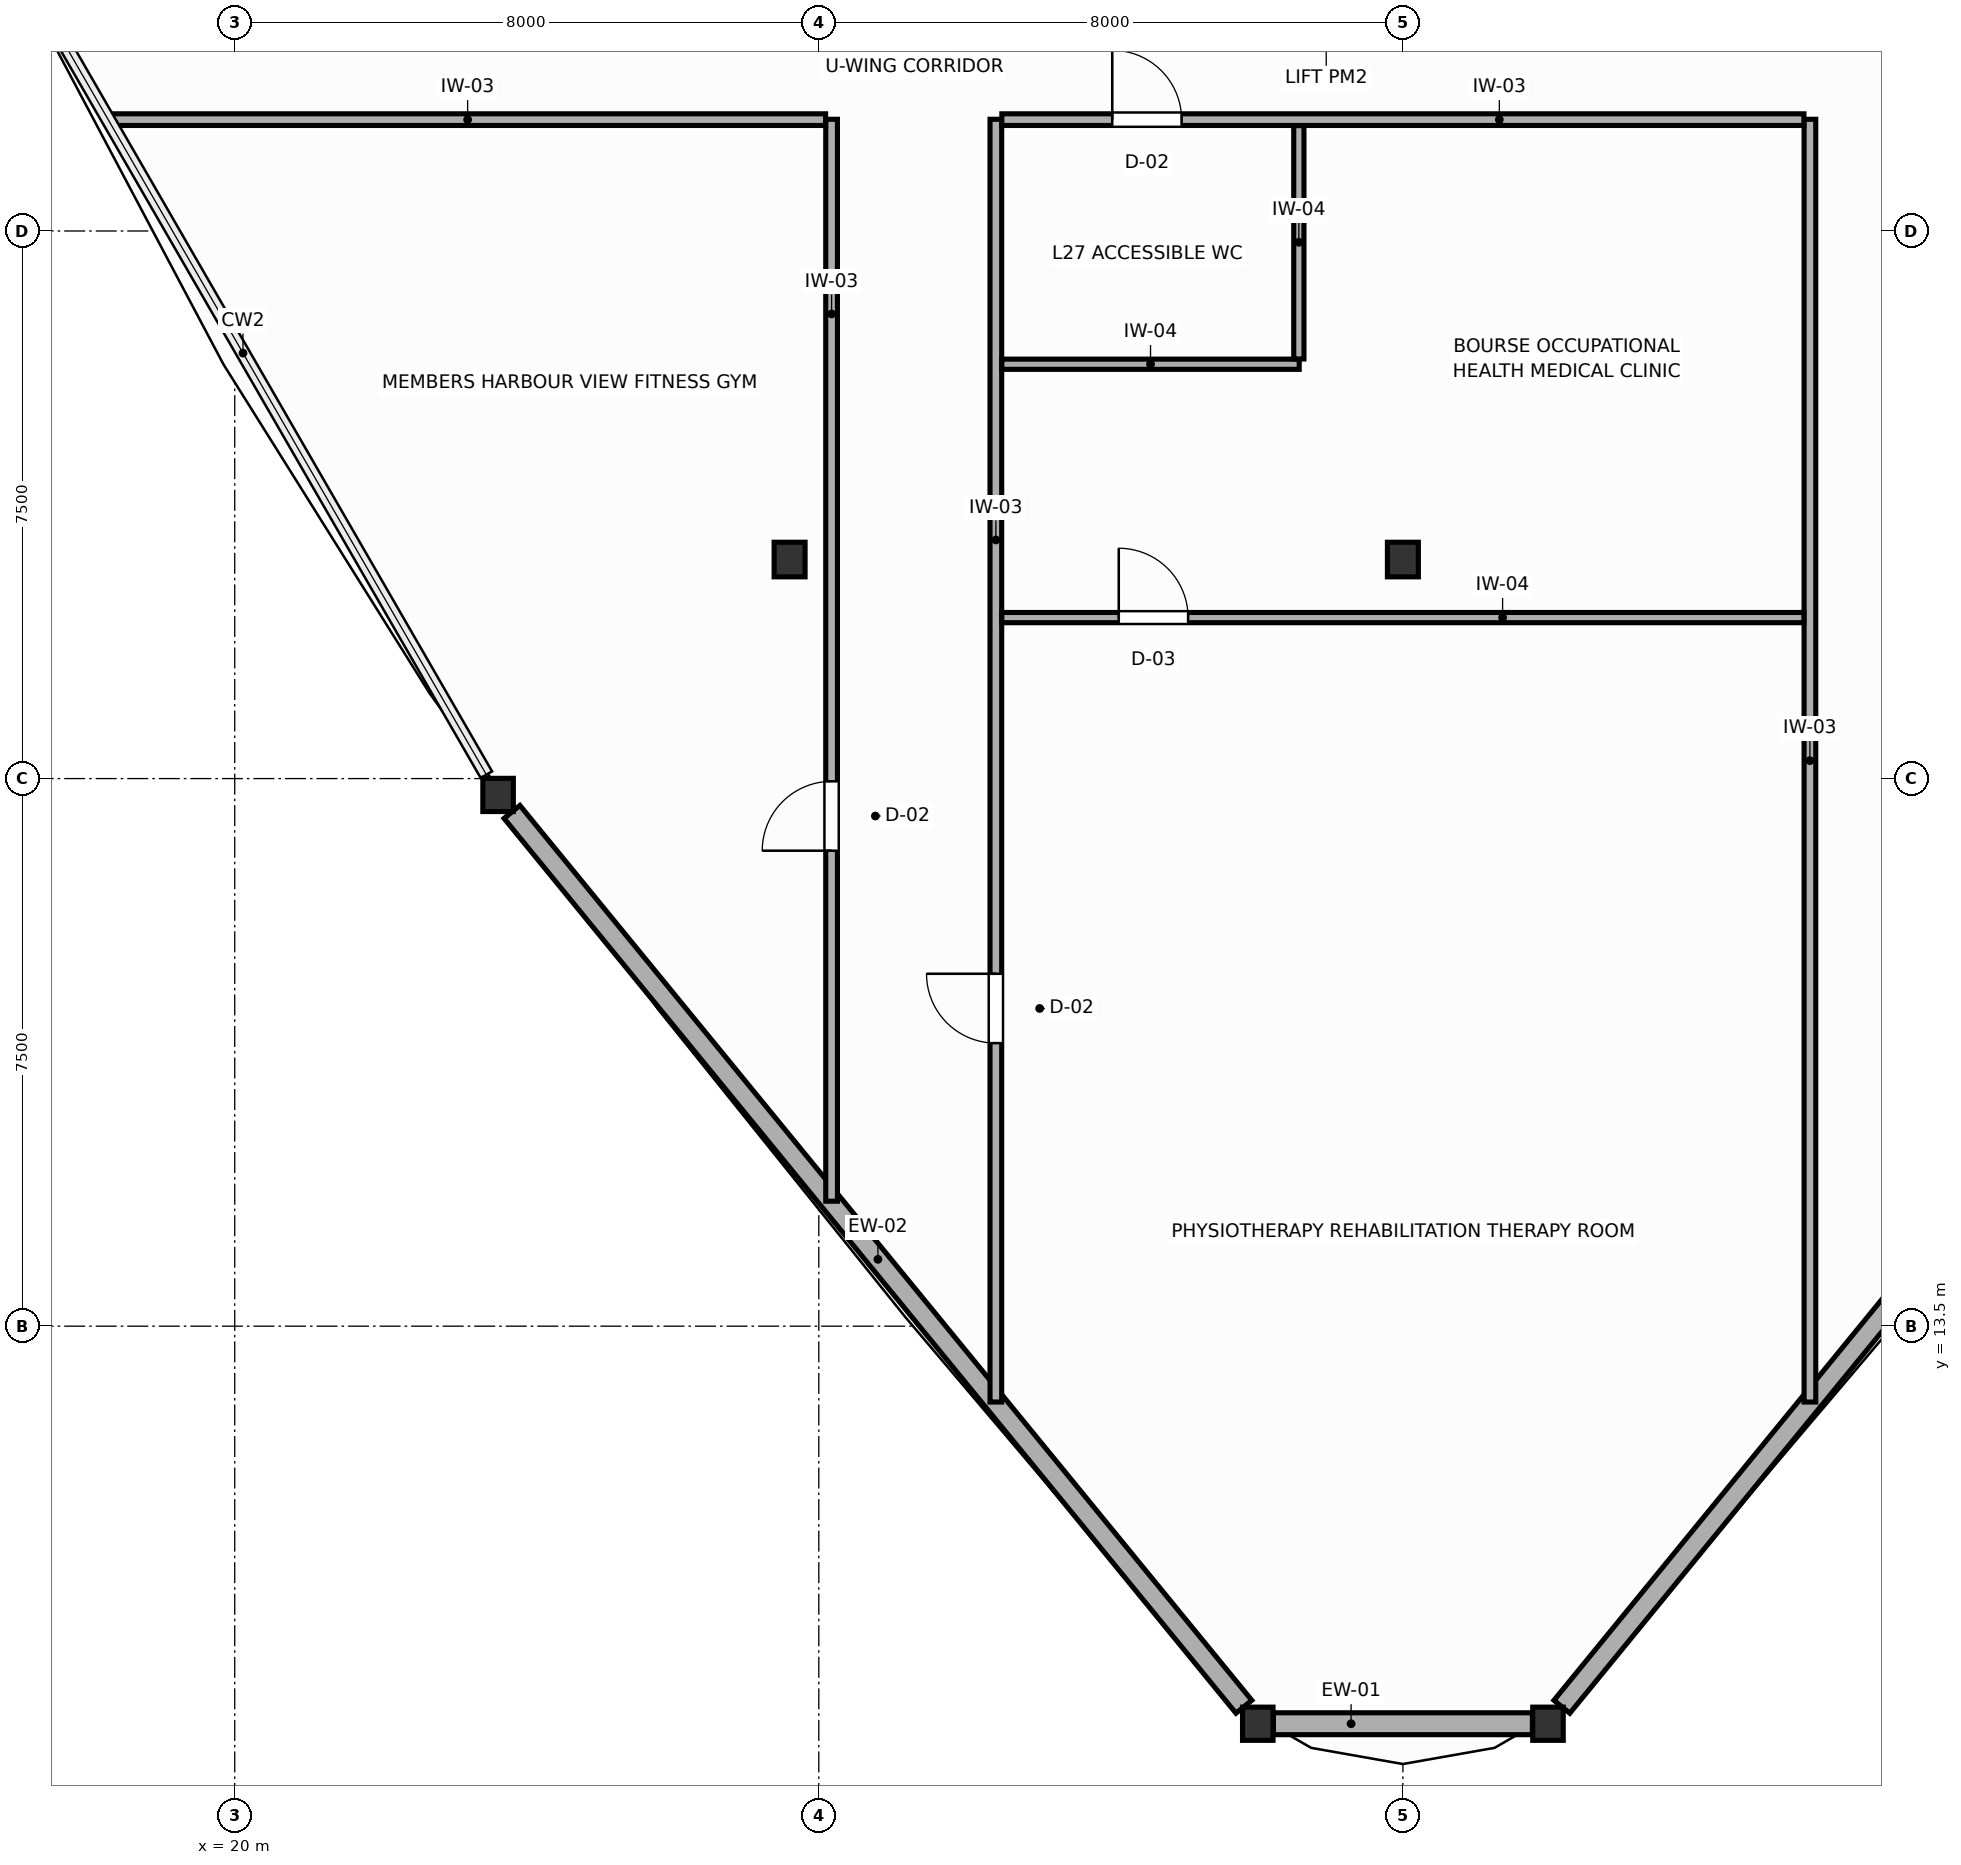
"""IFC4 building model, lengths in metres.
Left out: names, types, materials, properties, quantities, classifications, styles, units other than length and angle.
Written with IfcOpenShell. Run it as: python <this file> out.ifc"""

import sys

from ifc_helpers import new_model, si_unit, direction, frame, frame_2d, origin, origin_2d, place, context, subcontext, project, spatial, rectangle, i_section, extrude, source, transform, mapped, element, fill, save


model = new_model("IFC4")
c1 = context("Model", 3, precision=1e-05, world=origin(), true_north=direction((0.0, 1.0)))
c2 = subcontext(c1, "Body", "Model", "MODEL_VIEW")
j1 = project(units=[si_unit("LENGTHUNIT", "METRE"), si_unit("PLANEANGLEUNIT", "RADIAN")], contexts=[c1])
p1 = place(None, origin())
s1 = spatial("IfcSite", under=j1, at=p1, CompositionType="ELEMENT")
p2 = place(p1, origin())
s2 = spatial("IfcBuilding", under=s1, at=p2, CompositionType="ELEMENT")
p3 = place(p2, frame((0.0, 0.0, 109.8)))
s3 = spatial("IfcBuildingStorey", under=s2, at=p3, CompositionType="ELEMENT", Elevation=109.8)
m1 = source(origin(), c2, "Body", "SweptSolid", [
    extrude(i_section(OverallWidth=0.424, OverallDepth=0.474, WebThickness=0.045, FlangeThickness=0.072, FilletRadius=0.015, at=origin_2d()), origin(), (0.0, 0.0, 1.0), 3.6),
])
for number, where, z_axis, x_axis in (
    (1, (27.6, 24.0, 0.0), (0.0, 0.0, 1.0), (1.0, 0.0, 0.0)),
    (2, (36.0, 24.0, 0.0), (0.0, 0.0, 1.0), (1.0, 0.0, 0.0)),
):
    element("IfcColumn", number, at=place(p3, frame(where, z_axis=z_axis, x_axis=x_axis)), inside=s3, PredefinedType="COLUMN", context=c2, shape_type="MappedRepresentation", body=[
        mapped(m1, transform((0.0, 0.0, 0.0), scale=1.0)),
    ])
m2 = source(origin(), c2, "Body", "SweptSolid", [
    extrude(i_section(OverallWidth=0.418, OverallDepth=0.455, WebThickness=0.039, FlangeThickness=0.063, FilletRadius=0.015, at=origin_2d()), origin(), (0.0, 0.0, 1.0), 3.6),
])
for number, where, z_axis, x_axis in (
    (3, (23.607, 20.776, 0.0), (0.0, 0.0, 1.0), (1.0, 0.0, 0.0)),
    (4, (34.013, 8.055, 0.0), (0.0, 0.0, 1.0), (1.0, 0.0, 0.0)),
    (5, (37.987, 8.055, 0.0), (0.0, 0.0, 1.0), (1.0, 0.0, 0.0)),
):
    element("IfcColumn", number, at=place(p3, frame(where, z_axis=z_axis, x_axis=x_axis)), inside=s3, PredefinedType="COLUMN", context=c2, shape_type="MappedRepresentation", body=[
        mapped(m2, transform((0.0, 0.0, 0.0), scale=1.0)),
    ])
p4 = place(p3, frame((23.797, 20.543, 0.0), z_axis=(0.0, 0.0, 1.0), x_axis=(0.633140387555, -0.774036982092, 0.0)))
e6 = element("IfcWall", 6, at=p4, inside=s3, PredefinedType="SOLIDWALL", context=c2, shape_type="SweptSolid", body=[
    extrude(rectangle(XDim=15.834, YDim=0.28, at=frame_2d((7.917, 0.0))), origin(), (0.0, 0.0, 1.0), 1.87),
])
p5 = place(p3, frame((34.227, 8.055, 0.0), z_axis=(0.0, 0.0, 1.0), x_axis=(1.0, 0.0, 0.0)))
e7 = element("IfcWall", 7, at=p5, inside=s3, PredefinedType="SOLIDWALL", context=c2, shape_type="SweptSolid", body=[
    extrude(rectangle(XDim=3.547, YDim=0.3, at=frame_2d((1.773, 0.0))), origin(), (0.0, 0.0, 1.0), 1.87),
])
p6 = place(p3, frame((38.177, 8.287, 0.0), z_axis=(0.0, 0.0, 1.0), x_axis=(0.633140387555, 0.774036982092, 0.0)))
e8 = element("IfcWall", 8, at=p6, inside=s3, PredefinedType="SOLIDWALL", context=c2, shape_type="SweptSolid", body=[
    extrude(rectangle(XDim=15.834, YDim=0.28, at=frame_2d((7.917, 0.0))), origin(), (0.0, 0.0, 1.0), 1.87),
])
p7 = place(p3, frame((30.425, 12.461, 0.0), z_axis=(0.0, 0.0, 1.0), x_axis=(0.0, 1.0, 0.0)))
e9 = element("IfcWall", 9, at=p7, inside=s3, PredefinedType="PARTITIONING", context=c2, shape_type="SweptSolid", body=[
    extrude(rectangle(XDim=17.569, YDim=0.16, at=frame_2d((8.785, 0.0))), origin(), (0.0, 0.0, 1.0), 3.4),
])
p8 = place(p7, frame((4.916, 0.0, 0.0)))
e10 = element("IfcOpeningElement", 10, at=p8, cuts=e9, PredefinedType="OPENING", context=c2, shape_type="SweptSolid", body=[
    extrude(rectangle(XDim=0.95, YDim=2.05, at=frame_2d((0.475, 1.025))), frame((0.0, 0.09, 0.0), z_axis=(0.0, -1.0, 0.0), x_axis=(1.0, 0.0, 0.0)), (0.0, 0.0, 1.0), 0.18),
])
p9 = place(p3, frame((41.575, 12.461, 0.0), z_axis=(0.0, 0.0, 1.0), x_axis=(0.0, 1.0, 0.0)))
e11 = element("IfcWall", 11, at=p9, inside=s3, PredefinedType="PARTITIONING", context=c2, shape_type="SweptSolid", body=[
    extrude(rectangle(XDim=17.569, YDim=0.16, at=frame_2d((8.785, 0.0))), origin(), (0.0, 0.0, 1.0), 3.4),
])
p10 = place(p3, frame((28.175, 15.212, 0.0), z_axis=(0.0, 0.0, 1.0), x_axis=(0.0, 1.0, 0.0)))
e12 = element("IfcWall", 12, at=p10, inside=s3, PredefinedType="PARTITIONING", context=c2, shape_type="SweptSolid", body=[
    extrude(rectangle(XDim=14.818, YDim=0.16, at=frame_2d((7.409, 0.0))), origin(), (0.0, 0.0, 1.0), 3.4),
])
p11 = place(p10, frame((4.801, 0.0, 0.0)))
e13 = element("IfcOpeningElement", 13, at=p11, cuts=e12, PredefinedType="OPENING", context=c2, shape_type="SweptSolid", body=[
    extrude(rectangle(XDim=0.95, YDim=2.05, at=frame_2d((0.475, 1.025))), frame((0.0, 0.09, 0.0), z_axis=(0.0, -1.0, 0.0), x_axis=(1.0, 0.0, 0.0)), (0.0, 0.0, 1.0), 0.18),
])
p12 = place(p3, frame((30.507, 30.025, 0.0), z_axis=(0.0, 0.0, 1.0), x_axis=(1.0, 0.0, 0.0)))
e14 = element("IfcWall", 14, at=p12, inside=s3, PredefinedType="PARTITIONING", context=c2, shape_type="SweptSolid", body=[
    extrude(rectangle(XDim=10.986, YDim=0.16, at=frame_2d((5.493, 0.0))), origin(), (0.0, 0.0, 1.0), 3.4),
])
p13 = place(p12, frame((1.512, 0.0, 0.0)))
e15 = element("IfcOpeningElement", 15, at=p13, cuts=e14, PredefinedType="OPENING", context=c2, shape_type="SweptSolid", body=[
    extrude(rectangle(XDim=0.95, YDim=2.05, at=frame_2d((0.475, 1.025))), frame((0.0, 0.09, 0.0), z_axis=(0.0, -1.0, 0.0), x_axis=(1.0, 0.0, 0.0)), (0.0, 0.0, 1.0), 0.18),
])
p14 = place(p3, frame((18.287, 30.025, 0.0), z_axis=(0.0, 0.0, 1.0), x_axis=(1.0, 0.0, 0.0)))
e16 = element("IfcWall", 16, at=p14, inside=s3, PredefinedType="PARTITIONING", context=c2, shape_type="SweptSolid", body=[
    extrude(rectangle(XDim=9.806, YDim=0.16, at=frame_2d((4.903, 0.0))), origin(), (0.0, 0.0, 1.0), 3.4),
])
p15 = place(p3, frame((30.507, 23.205, 0.0), z_axis=(0.0, 0.0, 1.0), x_axis=(1.0, 0.0, 0.0)))
e17 = element("IfcWall", 17, at=p15, inside=s3, PredefinedType="PARTITIONING", context=c2, shape_type="SweptSolid", body=[
    extrude(rectangle(XDim=10.986, YDim=0.14, at=frame_2d((5.493, 0.0))), origin(), (0.0, 0.0, 1.0), 3.4),
])
p16 = place(p15, frame((1.601, 0.0, 0.0)))
e18 = element("IfcOpeningElement", 18, at=p16, cuts=e17, PredefinedType="OPENING", context=c2, shape_type="SweptSolid", body=[
    extrude(rectangle(XDim=0.95, YDim=2.05, at=frame_2d((0.475, 1.025))), frame((0.0, 0.08, 0.0), z_axis=(0.0, -1.0, 0.0), x_axis=(1.0, 0.0, 0.0)), (0.0, 0.0, 1.0), 0.16),
])
p17 = place(p3, frame((30.507, 26.675, 0.0), z_axis=(0.0, 0.0, 1.0), x_axis=(1.0, 0.0, 0.0)))
e19 = element("IfcWall", 19, at=p17, inside=s3, PredefinedType="PARTITIONING", context=c2, shape_type="SweptSolid", body=[
    extrude(rectangle(XDim=4.073, YDim=0.14, at=frame_2d((2.037, 0.0))), origin(), (0.0, 0.0, 1.0), 3.4),
])
p18 = place(p3, frame((34.575, 26.747, 0.0), z_axis=(0.0, 0.0, 1.0), x_axis=(0.0, 1.0, 0.0)))
e20 = element("IfcWall", 20, at=p18, inside=s3, PredefinedType="PARTITIONING", context=c2, shape_type="SweptSolid", body=[
    extrude(rectangle(XDim=3.196, YDim=0.14, at=frame_2d((1.598, 0.0))), origin(), (0.0, 0.0, 1.0), 3.4),
])
p19 = place(p8, origin())
e21 = element("IfcDoor", 21, at=p19, inside=s3, OperationType="SINGLE_SWING_RIGHT", PredefinedType="DOOR", context=c2, shape_type="SweptSolid", body=[
    extrude(rectangle(XDim=0.95, YDim=2.05, at=frame_2d((0.475, 1.025))), frame((0.0, 0.025, 0.0), z_axis=(0.0, -1.0, 0.0), x_axis=(1.0, 0.0, 0.0)), (0.0, 0.0, 1.0), 0.05),
])
fill(e10, e21)
p20 = place(p11, origin())
e22 = element("IfcDoor", 22, at=p20, inside=s3, OperationType="SINGLE_SWING_LEFT", PredefinedType="DOOR", context=c2, shape_type="SweptSolid", body=[
    extrude(rectangle(XDim=0.95, YDim=2.05, at=frame_2d((0.475, 1.025))), frame((0.0, 0.025, 0.0), z_axis=(0.0, -1.0, 0.0), x_axis=(1.0, 0.0, 0.0)), (0.0, 0.0, 1.0), 0.05),
])
fill(e13, e22)
p21 = place(p13, origin())
e23 = element("IfcDoor", 23, at=p21, inside=s3, OperationType="SINGLE_SWING_LEFT", PredefinedType="DOOR", context=c2, shape_type="SweptSolid", body=[
    extrude(rectangle(XDim=0.95, YDim=2.05, at=frame_2d((0.475, 1.025))), frame((0.0, 0.025, 0.0), z_axis=(0.0, -1.0, 0.0), x_axis=(1.0, 0.0, 0.0)), (0.0, 0.0, 1.0), 0.05),
])
fill(e15, e23)
p22 = place(p16, origin())
e24 = element("IfcDoor", 24, at=p22, inside=s3, OperationType="SINGLE_SWING_LEFT", PredefinedType="DOOR", context=c2, shape_type="SweptSolid", body=[
    extrude(rectangle(XDim=0.95, YDim=2.05, at=frame_2d((0.475, 1.025))), frame((0.0, 0.025, 0.0), z_axis=(0.0, -1.0, 0.0), x_axis=(1.0, 0.0, 0.0)), (0.0, 0.0, 1.0), 0.05),
])
fill(e18, e24)
save(model, sys.argv[1])
